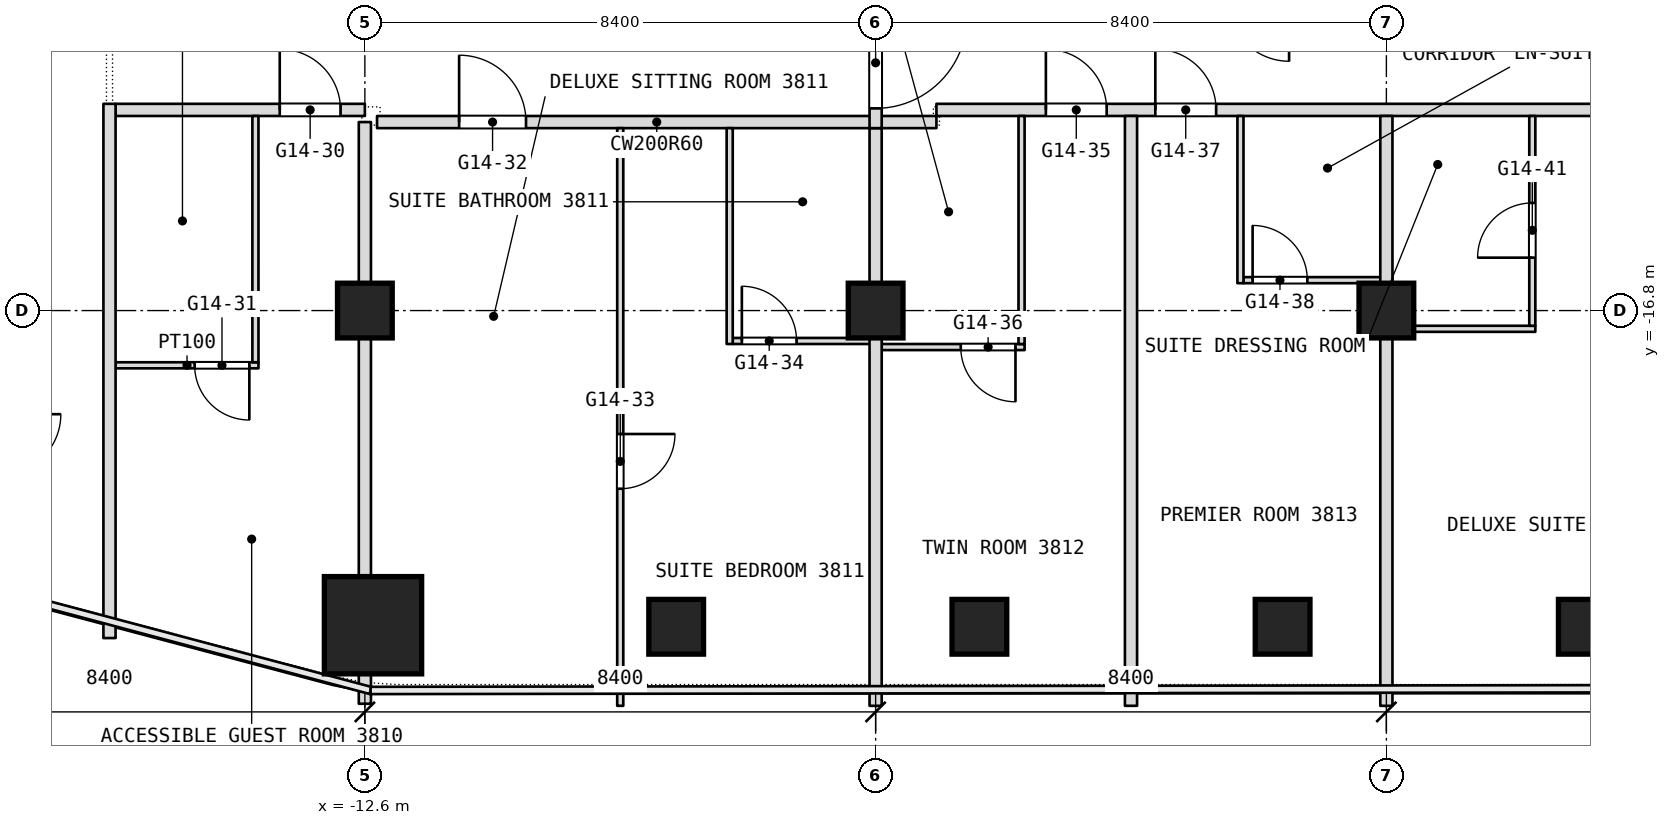
"""IFC4 building model, lengths in metres.
Left out: names, types, materials, properties, quantities, classifications, styles, units other than length and angle.
Written with IfcOpenShell. Run it as: python <this file> out.ifc"""

import sys

from ifc_helpers import new_model, si_unit, direction, frame, frame_2d, origin, origin_2d, place, context, subcontext, project, spatial, rectangle, extrude, element, fill, save


model = new_model("IFC4")
c1 = context("Model", 3, precision=1e-05, world=origin(), true_north=direction((0.0, 1.0)))
c2 = subcontext(c1, "Body", "Model", "MODEL_VIEW")
j1 = project(units=[si_unit("LENGTHUNIT", "METRE"), si_unit("PLANEANGLEUNIT", "RADIAN")], contexts=[c1])
p1 = place(None, origin())
s1 = spatial("IfcSite", under=j1, at=p1, CompositionType="ELEMENT")
p2 = place(p1, origin())
s2 = spatial("IfcBuilding", under=s1, at=p2, CompositionType="ELEMENT")
p3 = place(p2, frame((0.0, 0.0, 162.5)))
s3 = spatial("IfcBuildingStorey", under=s2, at=p3, CompositionType="ELEMENT", Elevation=162.5)
p4 = place(p3, frame((-12.466, -21.975, 0.0), z_axis=(0.0, 0.0, 1.0), x_axis=(1.0, 0.0, 0.0)))
e1 = element("IfcColumn", 1, at=p4, inside=s3, PredefinedType="COLUMN", context=c2, shape_type="SweptSolid", body=[
    extrude(rectangle(XDim=1.6, YDim=1.6, at=origin_2d()), origin(), (0.0, 0.0, 1.0), 3.6),
])
for number, where, z_axis, x_axis in (
    (2, (-12.6, -16.8, 0.0), (0.0, 0.0, 1.0), (1.0, 0.0, 0.0)),
    (3, (-4.2, -16.8, 0.0), (0.0, 0.0, 1.0), (1.0, 0.0, 0.0)),
    (4, (4.2, -16.8, 0.0), (0.0, 0.0, 1.0), (1.0, 0.0, 0.0)),
    (5, (7.48, -22.0, 0.0), (0.0, 0.0, 1.0), (1.0, 0.0, 0.0)),
    (6, (2.493, -22.0, 0.0), (0.0, 0.0, 1.0), (1.0, 0.0, 0.0)),
    (7, (-2.493, -22.0, 0.0), (0.0, 0.0, 1.0), (1.0, 0.0, 0.0)),
    (8, (-7.48, -22.0, 0.0), (0.0, 0.0, 1.0), (1.0, 0.0, 0.0)),
):
    element("IfcColumn", number, at=place(p3, frame(where, z_axis=z_axis, x_axis=x_axis)), inside=s3, PredefinedType="COLUMN", context=c2, shape_type="SweptSolid", body=[
        extrude(rectangle(XDim=0.9, YDim=0.9, at=origin_2d()), origin(), (0.0, 0.0, 1.0), 3.6),
    ])
p5 = place(p3, frame((-16.7, -17.7, 0.0), z_axis=(0.0, 0.0, 1.0), x_axis=(1.0, 0.0, 0.0)))
e9 = element("IfcWall", 9, at=p5, inside=s3, PredefinedType="PARTITIONING", context=c2, shape_type="SweptSolid", body=[
    extrude(rectangle(XDim=2.35, YDim=0.1, at=frame_2d((1.175, 0.0))), origin(), (0.0, 0.0, 1.0), 3.34),
])
p6 = place(p5, frame((1.3, 0.0, 0.0)))
e10 = element("IfcOpeningElement", 10, at=p6, cuts=e9, PredefinedType="OPENING", context=c2, shape_type="SweptSolid", body=[
    extrude(rectangle(XDim=0.9, YDim=2.1, at=frame_2d((0.45, 1.05))), frame((0.0, 0.05, 0.0), z_axis=(0.0, -1.0, 0.0), x_axis=(1.0, 0.0, 0.0)), (0.0, 0.0, 1.0), 0.1),
])
p7 = place(p3, frame((-4.1, -17.4, 0.0), z_axis=(0.0, 0.0, 1.0), x_axis=(1.0, 0.0, 0.0)))
e11 = element("IfcWall", 11, at=p7, inside=s3, PredefinedType="PARTITIONING", context=c2, shape_type="SweptSolid", body=[
    extrude(rectangle(XDim=2.35, YDim=0.1, at=frame_2d((1.175, 0.0))), origin(), (0.0, 0.0, 1.0), 3.34),
])
p8 = place(p7, frame((1.3, 0.0, 0.0)))
e12 = element("IfcOpeningElement", 12, at=p8, cuts=e11, PredefinedType="OPENING", context=c2, shape_type="SweptSolid", body=[
    extrude(rectangle(XDim=0.9, YDim=2.1, at=frame_2d((0.45, 1.05))), frame((0.0, 0.05, 0.0), z_axis=(0.0, -1.0, 0.0), x_axis=(1.0, 0.0, 0.0)), (0.0, 0.0, 1.0), 0.1),
])
p9 = place(p3, frame((-6.55, -17.3, 0.0), z_axis=(0.0, 0.0, 1.0), x_axis=(1.0, 0.0, 0.0)))
e13 = element("IfcWall", 13, at=p9, inside=s3, PredefinedType="PARTITIONING", context=c2, shape_type="SweptSolid", body=[
    extrude(rectangle(XDim=2.45, YDim=0.1, at=frame_2d((1.225, 0.0))), origin(), (0.0, 0.0, 1.0), 3.34),
])
p10 = place(p9, frame((0.15, 0.0, 0.0)))
e14 = element("IfcOpeningElement", 14, at=p10, cuts=e13, PredefinedType="OPENING", context=c2, shape_type="SweptSolid", body=[
    extrude(rectangle(XDim=0.9, YDim=2.1, at=frame_2d((0.45, 1.05))), frame((0.0, 0.05, 0.0), z_axis=(0.0, -1.0, 0.0), x_axis=(1.0, 0.0, 0.0)), (0.0, 0.0, 1.0), 0.1),
])
p11 = place(p3, frame((4.3, -17.1, 0.0), z_axis=(0.0, 0.0, 1.0), x_axis=(1.0, 0.0, 0.0)))
e15 = element("IfcWall", 15, at=p11, inside=s3, PredefinedType="PARTITIONING", context=c2, shape_type="SweptSolid", body=[
    extrude(rectangle(XDim=2.35, YDim=0.1, at=frame_2d((1.175, 0.0))), origin(), (0.0, 0.0, 1.0), 3.34),
])
p12 = place(p3, frame((1.85, -16.3, 0.0), z_axis=(0.0, 0.0, 1.0), x_axis=(1.0, 0.0, 0.0)))
e16 = element("IfcWall", 16, at=p12, inside=s3, PredefinedType="PARTITIONING", context=c2, shape_type="SweptSolid", body=[
    extrude(rectangle(XDim=2.45, YDim=0.1, at=frame_2d((1.225, 0.0))), origin(), (0.0, 0.0, 1.0), 3.34),
])
p13 = place(p12, frame((0.15, 0.0, 0.0)))
e17 = element("IfcOpeningElement", 17, at=p13, cuts=e16, PredefinedType="OPENING", context=c2, shape_type="SweptSolid", body=[
    extrude(rectangle(XDim=0.9, YDim=2.1, at=frame_2d((0.45, 1.05))), frame((0.0, 0.05, 0.0), z_axis=(0.0, -1.0, 0.0), x_axis=(1.0, 0.0, 0.0)), (0.0, 0.0, 1.0), 0.1),
])
p14 = place(p3, frame((-12.4, -13.7, 0.0), z_axis=(0.0, 0.0, 1.0), x_axis=(1.0, 0.0, 0.0)))
e18 = element("IfcWall", 18, at=p14, inside=s3, PredefinedType="PARTITIONING", context=c2, shape_type="SweptSolid", body=[
    extrude(rectangle(XDim=9.2, YDim=0.2, at=frame_2d((4.6, 0.0))), origin(), (0.0, 0.0, 1.0), 3.34),
])
p15 = place(p14, frame((1.35, 0.0, 0.0)))
e19 = element("IfcOpeningElement", 19, at=p15, cuts=e18, PredefinedType="OPENING", context=c2, shape_type="SweptSolid", body=[
    extrude(rectangle(XDim=1.1, YDim=2.1, at=frame_2d((0.55, 1.05))), frame((0.0, 0.1, 0.0), z_axis=(0.0, -1.0, 0.0), x_axis=(1.0, 0.0, 0.0)), (0.0, 0.0, 1.0), 0.2),
])
p16 = place(p3, frame((-16.7, -13.5, 0.0), z_axis=(0.0, 0.0, 1.0), x_axis=(1.0, 0.0, 0.0)))
e20 = element("IfcWall", 20, at=p16, inside=s3, PredefinedType="PARTITIONING", context=c2, shape_type="SweptSolid", body=[
    extrude(rectangle(XDim=4.1, YDim=0.2, at=frame_2d((2.05, 0.0))), origin(), (0.0, 0.0, 1.0), 3.34),
])
p17 = place(p16, frame((2.7, 0.0, 0.0)))
e21 = element("IfcOpeningElement", 21, at=p17, cuts=e20, PredefinedType="OPENING", context=c2, shape_type="SweptSolid", body=[
    extrude(rectangle(XDim=1.0, YDim=2.1, at=frame_2d((0.5, 1.05))), frame((0.0, 0.1, 0.0), z_axis=(0.0, -1.0, 0.0), x_axis=(1.0, 0.0, 0.0)), (0.0, 0.0, 1.0), 0.2),
])
p18 = place(p3, frame((-3.2, -13.5, 0.0), z_axis=(0.0, 0.0, 1.0), x_axis=(1.0, 0.0, 0.0)))
e22 = element("IfcWall", 22, at=p18, inside=s3, PredefinedType="PARTITIONING", context=c2, shape_type="SweptSolid", body=[
    extrude(rectangle(XDim=19.9, YDim=0.2, at=frame_2d((9.95, 0.0))), origin(), (0.0, 0.0, 1.0), 3.34),
])
p19 = place(p18, frame((1.8, 0.0, 0.0)))
e23 = element("IfcOpeningElement", 23, at=p19, cuts=e22, PredefinedType="OPENING", context=c2, shape_type="SweptSolid", body=[
    extrude(rectangle(XDim=1.0, YDim=2.1, at=frame_2d((0.5, 1.05))), frame((0.0, 0.1, 0.0), z_axis=(0.0, -1.0, 0.0), x_axis=(1.0, 0.0, 0.0)), (0.0, 0.0, 1.0), 0.2),
])
p20 = place(p18, frame((3.6, 0.0, 0.0)))
e24 = element("IfcOpeningElement", 24, at=p20, cuts=e22, PredefinedType="OPENING", context=c2, shape_type="SweptSolid", body=[
    extrude(rectangle(XDim=1.0, YDim=2.1, at=frame_2d((0.5, 1.05))), frame((0.0, 0.1, 0.0), z_axis=(0.0, -1.0, 0.0), x_axis=(1.0, 0.0, 0.0)), (0.0, 0.0, 1.0), 0.2),
])
p21 = place(p18, frame((11.0, 0.0, 0.0)))
e25 = element("IfcOpeningElement", 25, at=p21, cuts=e22, PredefinedType="OPENING", context=c2, shape_type="SweptSolid", body=[
    extrude(rectangle(XDim=1.1, YDim=2.1, at=frame_2d((0.55, 1.05))), frame((0.0, 0.1, 0.0), z_axis=(0.0, -1.0, 0.0), x_axis=(1.0, 0.0, 0.0)), (0.0, 0.0, 1.0), 0.2),
])
p22 = place(p18, frame((18.6, 0.0, 0.0)))
e26 = element("IfcOpeningElement", 26, at=p22, cuts=e22, PredefinedType="OPENING", context=c2, shape_type="SweptSolid", body=[
    extrude(rectangle(XDim=1.0, YDim=2.1, at=frame_2d((0.5, 1.05))), frame((0.0, 0.1, 0.0), z_axis=(0.0, -1.0, 0.0), x_axis=(1.0, 0.0, 0.0)), (0.0, 0.0, 1.0), 0.2),
])
p23 = place(p3, frame((6.6, -17.05, 0.0), z_axis=(0.0, 0.0, 1.0), x_axis=(0.0, 1.0, 0.0)))
e27 = element("IfcWall", 27, at=p23, inside=s3, PredefinedType="PARTITIONING", context=c2, shape_type="SweptSolid", body=[
    extrude(rectangle(XDim=3.45, YDim=0.1, at=frame_2d((1.725, 0.0))), origin(), (0.0, 0.0, 1.0), 3.34),
])
p24 = place(p23, frame((1.12, 0.0, 0.0)))
e28 = element("IfcOpeningElement", 28, at=p24, cuts=e27, PredefinedType="OPENING", context=c2, shape_type="SweptSolid", body=[
    extrude(rectangle(XDim=0.9, YDim=2.1, at=frame_2d((0.45, 1.05))), frame((0.0, 0.05, 0.0), z_axis=(0.0, -1.0, 0.0), x_axis=(1.0, 0.0, 0.0)), (0.0, 0.0, 1.0), 0.1),
])
p25 = place(p3, frame((4.2, -23.3, 0.0), z_axis=(0.0, 0.0, 1.0), x_axis=(0.0, 1.0, 0.0)))
e29 = element("IfcWall", 29, at=p25, inside=s3, PredefinedType="PARTITIONING", context=c2, shape_type="SweptSolid", body=[
    extrude(rectangle(XDim=9.7, YDim=0.2, at=frame_2d((4.85, 0.0))), origin(), (0.0, 0.0, 1.0), 3.34),
])
p26 = place(p3, frame((1.8, -16.35, 0.0), z_axis=(0.0, 0.0, 1.0), x_axis=(0.0, 1.0, 0.0)))
e30 = element("IfcWall", 30, at=p26, inside=s3, PredefinedType="PARTITIONING", context=c2, shape_type="SweptSolid", body=[
    extrude(rectangle(XDim=2.75, YDim=0.1, at=frame_2d((1.375, 0.0))), origin(), (0.0, 0.0, 1.0), 3.34),
])
p27 = place(p3, frame((0.0, -23.3, 0.0), z_axis=(0.0, 0.0, 1.0), x_axis=(0.0, 1.0, 0.0)))
e31 = element("IfcWall", 31, at=p27, inside=s3, PredefinedType="PARTITIONING", context=c2, shape_type="SweptSolid", body=[
    extrude(rectangle(XDim=9.7, YDim=0.2, at=frame_2d((4.85, 0.0))), origin(), (0.0, 0.0, 1.0), 3.34),
])
p28 = place(p3, frame((-1.8, -17.35, 0.0), z_axis=(0.0, 0.0, 1.0), x_axis=(0.0, 1.0, 0.0)))
e32 = element("IfcWall", 32, at=p28, inside=s3, PredefinedType="PARTITIONING", context=c2, shape_type="SweptSolid", body=[
    extrude(rectangle(XDim=3.75, YDim=0.1, at=frame_2d((1.875, 0.0))), origin(), (0.0, 0.0, 1.0), 3.34),
])
p29 = place(p3, frame((-4.2, -23.3, 0.0), z_axis=(0.0, 0.0, 1.0), x_axis=(0.0, 1.0, 0.0)))
e33 = element("IfcWall", 33, at=p29, inside=s3, PredefinedType="PARTITIONING", context=c2, shape_type="SweptSolid", body=[
    extrude(rectangle(XDim=9.5, YDim=0.2, at=frame_2d((4.75, 0.0))), origin(), (0.0, 0.0, 1.0), 3.34),
])
p30 = place(p3, frame((-4.2, -13.8, 0.0), z_axis=(0.0, 0.0, 1.0), x_axis=(0.0, 1.0, 0.0)))
e34 = element("IfcWall", 34, at=p30, inside=s3, PredefinedType="PARTITIONING", context=c2, shape_type="SweptSolid", body=[
    extrude(rectangle(XDim=13.8, YDim=0.2, at=frame_2d((6.9, 0.0))), origin(), (0.0, 0.0, 1.0), 3.34),
])
p31 = place(p30, frame((12.15, 0.0, 0.0)))
e35 = element("IfcOpeningElement", 35, at=p31, cuts=e34, PredefinedType="OPENING", context=c2, shape_type="SweptSolid", body=[
    extrude(rectangle(XDim=1.5, YDim=2.1, at=frame_2d((0.75, 1.05))), frame((0.0, 0.1, 0.0), z_axis=(0.0, -1.0, 0.0), x_axis=(1.0, 0.0, 0.0)), (0.0, 0.0, 1.0), 0.2),
])
p32 = place(p30, frame((0.325, 0.0, 0.0)))
e36 = element("IfcOpeningElement", 36, at=p32, cuts=e34, PredefinedType="OPENING", context=c2, shape_type="SweptSolid", body=[
    extrude(rectangle(XDim=1.5, YDim=2.1, at=frame_2d((0.75, 1.05))), frame((0.0, 0.1, 0.0), z_axis=(0.0, -1.0, 0.0), x_axis=(1.0, 0.0, 0.0)), (0.0, 0.0, 1.0), 0.2),
])
p33 = place(p3, frame((-6.6, -17.35, 0.0), z_axis=(0.0, 0.0, 1.0), x_axis=(0.0, 1.0, 0.0)))
e37 = element("IfcWall", 37, at=p33, inside=s3, PredefinedType="PARTITIONING", context=c2, shape_type="SweptSolid", body=[
    extrude(rectangle(XDim=3.55, YDim=0.1, at=frame_2d((1.775, 0.0))), origin(), (0.0, 0.0, 1.0), 3.34),
])
p34 = place(p3, frame((-8.4, -23.3, 0.0), z_axis=(0.0, 0.0, 1.0), x_axis=(0.0, 1.0, 0.0)))
e38 = element("IfcWall", 38, at=p34, inside=s3, PredefinedType="PARTITIONING", context=c2, shape_type="SweptSolid", body=[
    extrude(rectangle(XDim=9.5, YDim=0.1, at=frame_2d((4.75, 0.0))), origin(), (0.0, 0.0, 1.0), 3.34),
])
p35 = place(p34, frame((3.57, 0.0, 0.0)))
e39 = element("IfcOpeningElement", 39, at=p35, cuts=e38, PredefinedType="OPENING", context=c2, shape_type="SweptSolid", body=[
    extrude(rectangle(XDim=0.9, YDim=2.1, at=frame_2d((0.45, 1.05))), frame((0.0, 0.05, 0.0), z_axis=(0.0, -1.0, 0.0), x_axis=(1.0, 0.0, 0.0)), (0.0, 0.0, 1.0), 0.1),
])
p36 = place(p3, frame((-12.6, -23.266, 0.0), z_axis=(0.0, 0.0, 1.0), x_axis=(0.0, 1.0, 0.0)))
e40 = element("IfcWall", 40, at=p36, inside=s3, PredefinedType="PARTITIONING", context=c2, shape_type="SweptSolid", body=[
    extrude(rectangle(XDim=0.491, YDim=0.2, at=frame_2d((0.246, 0.0))), origin(), (0.0, 0.0, 1.0), 3.34),
])
p37 = place(p3, frame((-12.6, -21.175, 0.0), z_axis=(0.0, 0.0, 1.0), x_axis=(0.0, 1.0, 0.0)))
e41 = element("IfcWall", 41, at=p37, inside=s3, PredefinedType="PARTITIONING", context=c2, shape_type="SweptSolid", body=[
    extrude(rectangle(XDim=7.475, YDim=0.2, at=frame_2d((3.738, 0.0))), origin(), (0.0, 0.0, 1.0), 3.34),
])
p38 = place(p3, frame((-14.4, -17.65, 0.0), z_axis=(0.0, 0.0, 1.0), x_axis=(0.0, 1.0, 0.0)))
e42 = element("IfcWall", 42, at=p38, inside=s3, PredefinedType="PARTITIONING", context=c2, shape_type="SweptSolid", body=[
    extrude(rectangle(XDim=4.05, YDim=0.1, at=frame_2d((2.025, 0.0))), origin(), (0.0, 0.0, 1.0), 3.34),
])
p39 = place(p3, frame((-16.8, -22.186, 0.0), z_axis=(0.0, 0.0, 1.0), x_axis=(0.0, 1.0, 0.0)))
e43 = element("IfcWall", 43, at=p39, inside=s3, PredefinedType="PARTITIONING", context=c2, shape_type="SweptSolid", body=[
    extrude(rectangle(XDim=8.786, YDim=0.2, at=frame_2d((4.393, 0.0))), origin(), (0.0, 0.0, 1.0), 3.34),
])
p40 = place(p6, origin())
e44 = element("IfcDoor", 44, at=p40, inside=s3, OperationType="SINGLE_SWING_RIGHT", PredefinedType="DOOR", context=c2, shape_type="SweptSolid", body=[
    extrude(rectangle(XDim=0.9, YDim=2.1, at=frame_2d((0.45, 1.05))), frame((0.0, 0.025, 0.0), z_axis=(0.0, -1.0, 0.0), x_axis=(1.0, 0.0, 0.0)), (0.0, 0.0, 1.0), 0.05),
])
fill(e10, e44)
p41 = place(p8, origin())
e45 = element("IfcDoor", 45, at=p41, inside=s3, OperationType="SINGLE_SWING_RIGHT", PredefinedType="DOOR", context=c2, shape_type="SweptSolid", body=[
    extrude(rectangle(XDim=0.9, YDim=2.1, at=frame_2d((0.45, 1.05))), frame((0.0, 0.025, 0.0), z_axis=(0.0, -1.0, 0.0), x_axis=(1.0, 0.0, 0.0)), (0.0, 0.0, 1.0), 0.05),
])
fill(e12, e45)
p42 = place(p10, origin())
e46 = element("IfcDoor", 46, at=p42, inside=s3, OperationType="SINGLE_SWING_LEFT", PredefinedType="DOOR", context=c2, shape_type="SweptSolid", body=[
    extrude(rectangle(XDim=0.9, YDim=2.1, at=frame_2d((0.45, 1.05))), frame((0.0, 0.025, 0.0), z_axis=(0.0, -1.0, 0.0), x_axis=(1.0, 0.0, 0.0)), (0.0, 0.0, 1.0), 0.05),
])
fill(e14, e46)
p43 = place(p13, origin())
e47 = element("IfcDoor", 47, at=p43, inside=s3, OperationType="SINGLE_SWING_LEFT", PredefinedType="DOOR", context=c2, shape_type="SweptSolid", body=[
    extrude(rectangle(XDim=0.9, YDim=2.1, at=frame_2d((0.45, 1.05))), frame((0.0, 0.025, 0.0), z_axis=(0.0, -1.0, 0.0), x_axis=(1.0, 0.0, 0.0)), (0.0, 0.0, 1.0), 0.05),
])
fill(e17, e47)
p44 = place(p15, origin())
e48 = element("IfcDoor", 48, at=p44, inside=s3, OperationType="SINGLE_SWING_RIGHT", PredefinedType="DOOR", context=c2, shape_type="SweptSolid", body=[
    extrude(rectangle(XDim=1.1, YDim=2.1, at=frame_2d((0.55, 1.05))), frame((0.0, 0.025, 0.0), z_axis=(0.0, -1.0, 0.0), x_axis=(1.0, 0.0, 0.0)), (0.0, 0.0, 1.0), 0.05),
])
fill(e19, e48)
p45 = place(p17, origin())
e49 = element("IfcDoor", 49, at=p45, inside=s3, OperationType="SINGLE_SWING_RIGHT", PredefinedType="DOOR", context=c2, shape_type="SweptSolid", body=[
    extrude(rectangle(XDim=1.0, YDim=2.1, at=frame_2d((0.5, 1.05))), frame((0.0, 0.025, 0.0), z_axis=(0.0, -1.0, 0.0), x_axis=(1.0, 0.0, 0.0)), (0.0, 0.0, 1.0), 0.05),
])
fill(e21, e49)
p46 = place(p19, origin())
e50 = element("IfcDoor", 50, at=p46, inside=s3, OperationType="SINGLE_SWING_LEFT", PredefinedType="DOOR", context=c2, shape_type="SweptSolid", body=[
    extrude(rectangle(XDim=1.0, YDim=2.1, at=frame_2d((0.5, 1.05))), frame((0.0, 0.025, 0.0), z_axis=(0.0, -1.0, 0.0), x_axis=(1.0, 0.0, 0.0)), (0.0, 0.0, 1.0), 0.05),
])
fill(e23, e50)
p47 = place(p20, origin())
e51 = element("IfcDoor", 51, at=p47, inside=s3, OperationType="SINGLE_SWING_LEFT", PredefinedType="DOOR", context=c2, shape_type="SweptSolid", body=[
    extrude(rectangle(XDim=1.0, YDim=2.1, at=frame_2d((0.5, 1.05))), frame((0.0, 0.025, 0.0), z_axis=(0.0, -1.0, 0.0), x_axis=(1.0, 0.0, 0.0)), (0.0, 0.0, 1.0), 0.05),
])
fill(e24, e51)
p48 = place(p24, origin())
e52 = element("IfcDoor", 52, at=p48, inside=s3, OperationType="SINGLE_SWING_LEFT", PredefinedType="DOOR", context=c2, shape_type="SweptSolid", body=[
    extrude(rectangle(XDim=0.9, YDim=2.1, at=frame_2d((0.45, 1.05))), frame((0.0, 0.025, 0.0), z_axis=(0.0, -1.0, 0.0), x_axis=(1.0, 0.0, 0.0)), (0.0, 0.0, 1.0), 0.05),
])
fill(e28, e52)
p49 = place(p35, origin())
e53 = element("IfcDoor", 53, at=p49, inside=s3, OperationType="SINGLE_SWING_RIGHT", PredefinedType="DOOR", context=c2, shape_type="SweptSolid", body=[
    extrude(rectangle(XDim=0.9, YDim=2.1, at=frame_2d((0.45, 1.05))), frame((0.0, 0.025, 0.0), z_axis=(0.0, -1.0, 0.0), x_axis=(1.0, 0.0, 0.0)), (0.0, 0.0, 1.0), 0.05),
])
fill(e39, e53)
p50 = place(p32, origin())
e54 = element("IfcDoor", 54, at=p50, inside=s3, OperationType="DOUBLE_DOOR_DOUBLE_SWING", PredefinedType="DOOR", context=c2, shape_type="SweptSolid", body=[
    extrude(rectangle(XDim=1.5, YDim=2.1, at=frame_2d((0.75, 1.05))), frame((0.0, 0.025, 0.0), z_axis=(0.0, -1.0, 0.0), x_axis=(1.0, 0.0, 0.0)), (0.0, 0.0, 1.0), 0.05),
])
fill(e36, e54)
save(model, sys.argv[1])
